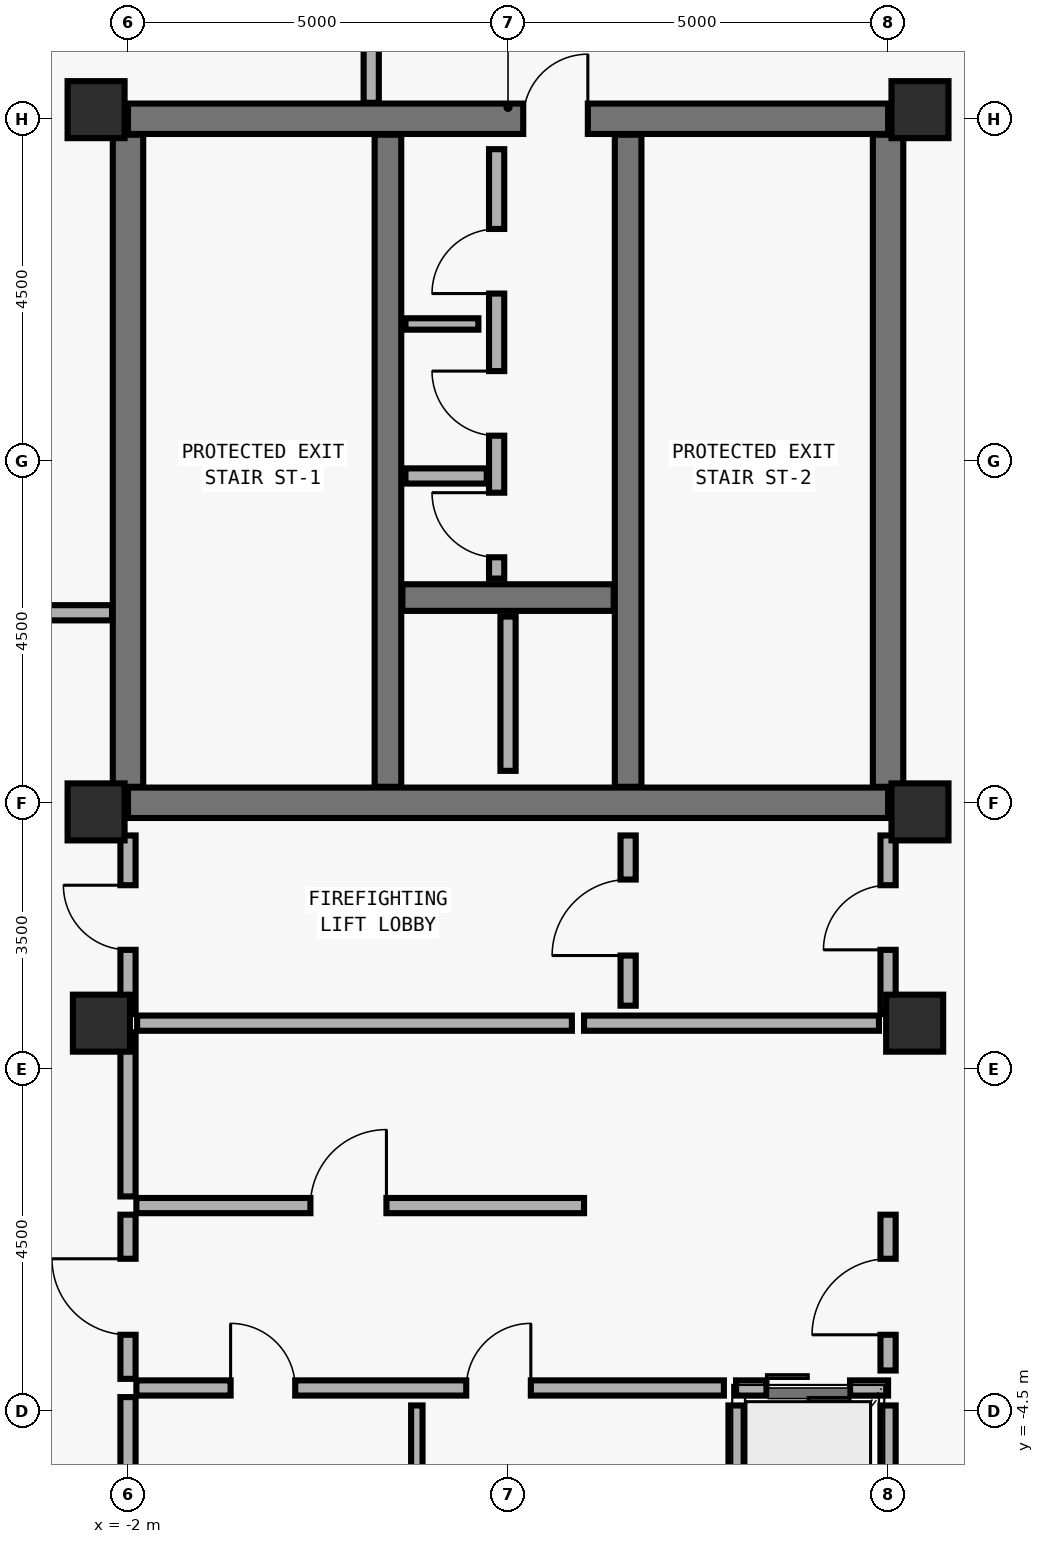
"""IFC4 building model, lengths in metres.
Left out: names, types, materials, properties, quantities, classifications, styles, units other than length and angle.
Written with IfcOpenShell. Run it as: python <this file> out.ifc"""

import sys

from ifc_helpers import new_model, si_unit, direction, frame, frame_2d, origin, origin_2d, place, context, subcontext, project, spatial, rectangle, extrude, element, fill, save


model = new_model("IFC4")
c1 = context("Model", 3, precision=1e-05, world=origin(), true_north=direction((0.0, 1.0)))
c2 = subcontext(c1, "Body", "Model", "MODEL_VIEW")
j1 = project(units=[si_unit("LENGTHUNIT", "METRE"), si_unit("PLANEANGLEUNIT", "RADIAN")], contexts=[c1])
p1 = place(None, origin())
s1 = spatial("IfcSite", under=j1, at=p1, CompositionType="ELEMENT")
p2 = place(p1, origin())
s2 = spatial("IfcBuilding", under=s1, at=p2, CompositionType="ELEMENT")
p3 = place(p2, frame((0.0, 0.0, 298.2)))
s3 = spatial("IfcBuildingStorey", under=s2, at=p3, CompositionType="ELEMENT", Elevation=298.2)
p4 = place(p3, frame((-2.0, 3.5, 0.0), z_axis=(0.0, 0.0, 1.0), x_axis=(1.0, 0.0, 0.0)))
e1 = element("IfcWall", 1, at=p4, inside=s3, PredefinedType="SHEAR", context=c2, shape_type="SweptSolid", body=[
    extrude(rectangle(XDim=10.0, YDim=0.4, at=frame_2d((5.0, 0.0))), origin(), (0.0, 0.0, 1.0), 4.192),
])
p5 = place(p3, frame((-2.0, 12.5, 0.0), z_axis=(0.0, 0.0, 1.0), x_axis=(1.0, 0.0, 0.0)))
e2 = element("IfcWall", 2, at=p5, inside=s3, PredefinedType="SHEAR", context=c2, shape_type="SweptSolid", body=[
    extrude(rectangle(XDim=10.0, YDim=0.4, at=frame_2d((5.0, 0.0))), origin(), (0.0, 0.0, 1.0), 4.192),
])
p6 = place(p5, frame((5.2, 0.0, 0.0)))
e3 = element("IfcOpeningElement", 3, at=p6, cuts=e2, PredefinedType="OPENING", context=c2, shape_type="SweptSolid", body=[
    extrude(rectangle(XDim=0.85, YDim=2.1, at=frame_2d((0.425, 1.05))), frame((0.0, 0.21, 0.0), z_axis=(0.0, -1.0, 0.0), x_axis=(1.0, 0.0, 0.0)), (0.0, 0.0, 1.0), 0.42),
])
for number, where, z_axis, x_axis in (
    (4, (-2.0, 3.71, 0.0), (0.0, 0.0, 1.0), (0.0, 1.0, 0.0)),
    (5, (8.0, 3.71, 0.0), (0.0, 0.0, 1.0), (0.0, 1.0, 0.0)),
):
    element("IfcWall", number, at=place(p3, frame(where, z_axis=z_axis, x_axis=x_axis)), inside=s3, PredefinedType="SHEAR", context=c2, shape_type="SweptSolid", body=[
        extrude(rectangle(XDim=8.58, YDim=0.4, at=frame_2d((4.29, 0.0))), origin(), (0.0, 0.0, 1.0), 4.192),
    ])
for number, where, z_axis, x_axis in (
    (6, (1.42, 3.71, 0.0), (0.0, 0.0, 1.0), (0.0, 1.0, 0.0)),
    (7, (4.58, 3.71, 0.0), (0.0, 0.0, 1.0), (0.0, 1.0, 0.0)),
):
    element("IfcWall", number, at=place(p3, frame(where, z_axis=z_axis, x_axis=x_axis)), inside=s3, PredefinedType="SHEAR", context=c2, shape_type="SweptSolid", body=[
        extrude(rectangle(XDim=8.58, YDim=0.35, at=frame_2d((4.29, 0.0))), origin(), (0.0, 0.0, 1.0), 4.192),
    ])
p7 = place(p3, frame((1.61, 6.2, 0.0), z_axis=(0.0, 0.0, 1.0), x_axis=(1.0, 0.0, 0.0)))
e8 = element("IfcWall", 8, at=p7, inside=s3, PredefinedType="SHEAR", context=c2, shape_type="SweptSolid", body=[
    extrude(rectangle(XDim=2.78, YDim=0.35, at=frame_2d((1.39, 0.0))), origin(), (0.0, 0.0, 1.0), 4.192),
])
for number, where, z_axis, x_axis in (
    (9, (-2.42, 12.62, 0.0), (0.0, 0.0, 1.0), (1.0, 0.0, 0.0)),
    (10, (8.42, 12.62, 0.0), (0.0, 0.0, 1.0), (1.0, 0.0, 0.0)),
    (11, (-2.42, 3.38, 0.0), (0.0, 0.0, 1.0), (1.0, 0.0, 0.0)),
    (12, (8.42, 3.38, 0.0), (0.0, 0.0, 1.0), (1.0, 0.0, 0.0)),
    (13, (-2.35, 0.6, 0.0), (0.0, 0.0, 1.0), (1.0, 0.0, 0.0)),
    (14, (8.35, 0.6, 0.0), (0.0, 0.0, 1.0), (1.0, 0.0, 0.0)),
):
    element("IfcColumn", number, at=place(p3, frame(where, z_axis=z_axis, x_axis=x_axis)), inside=s3, PredefinedType="COLUMN", context=c2, shape_type="SweptSolid", body=[
        extrude(rectangle(XDim=0.75, YDim=0.75, at=origin_2d()), origin(), (0.0, 0.0, 1.0), 4.175),
    ])
p8 = place(p3, frame((3.0, 3.92, 0.0), z_axis=(0.0, 0.0, 1.0), x_axis=(0.0, 1.0, 0.0)))
e15 = element("IfcWall", 15, at=p8, inside=s3, PredefinedType="SOLIDWALL", context=c2, shape_type="SweptSolid", body=[
    extrude(rectangle(XDim=2.03, YDim=0.2, at=frame_2d((1.015, 0.0))), origin(), (0.0, 0.0, 1.0), 3.96),
])
p9 = place(p3, frame((1.65, 7.8, 0.0), z_axis=(0.0, 0.0, 1.0), x_axis=(1.0, 0.0, 0.0)))
e16 = element("IfcWall", 16, at=p9, inside=s3, PredefinedType="SOLIDWALL", context=c2, shape_type="SweptSolid", body=[
    extrude(rectangle(XDim=1.07, YDim=0.2, at=frame_2d((0.535, 0.0))), origin(), (0.0, 0.0, 1.0), 3.96),
])
p10 = place(p3, frame((4.0, 0.6, 0.0), z_axis=(0.0, 0.0, 1.0), x_axis=(1.0, 0.0, 0.0)))
e17 = element("IfcWall", 17, at=p10, inside=s3, PredefinedType="SOLIDWALL", context=c2, shape_type="SweptSolid", body=[
    extrude(rectangle(XDim=3.88, YDim=0.2, at=frame_2d((1.94, 0.0))), origin(), (0.0, 0.0, 1.0), 3.672),
])
p11 = place(p3, frame((6.0, -4.2, 0.0), z_axis=(0.0, 0.0, 1.0), x_axis=(1.0, 0.0, 0.0)))
e18 = element("IfcWall", 18, at=p11, inside=s3, PredefinedType="SOLIDWALL", context=c2, shape_type="SweptSolid", body=[
    extrude(rectangle(XDim=2.0, YDim=0.2, at=frame_2d((1.0, 0.0))), origin(), (0.0, 0.0, 1.0), 3.96),
])
p12 = place(p11, frame((0.4, 0.0, 0.0)))
e19 = element("IfcOpeningElement", 19, at=p12, cuts=e18, PredefinedType="OPENING", context=c2, shape_type="SweptSolid", body=[
    extrude(rectangle(XDim=1.1, YDim=2.2, at=frame_2d((0.55, 1.1))), frame((0.0, 0.11, 0.0), z_axis=(0.0, -1.0, 0.0), x_axis=(1.0, 0.0, 0.0)), (0.0, 0.0, 1.0), 0.22),
])
p13 = place(p3, frame((6.0, -6.37, 0.0), z_axis=(0.0, 0.0, 1.0), x_axis=(0.0, 1.0, 0.0)))
e20 = element("IfcWall", 20, at=p13, inside=s3, PredefinedType="SOLIDWALL", context=c2, shape_type="SweptSolid", body=[
    extrude(rectangle(XDim=1.94, YDim=0.2, at=frame_2d((0.97, 0.0))), origin(), (0.0, 0.0, 1.0), 3.96),
])
p14 = place(p3, frame((8.0, -6.37, 0.0), z_axis=(0.0, 0.0, 1.0), x_axis=(0.0, 1.0, 0.0)))
e21 = element("IfcWall", 21, at=p14, inside=s3, PredefinedType="SOLIDWALL", context=c2, shape_type="SweptSolid", body=[
    extrude(rectangle(XDim=1.94, YDim=0.2, at=frame_2d((0.97, 0.0))), origin(), (0.0, 0.0, 1.0), 3.672),
])
p15 = place(p3, frame((2.85, 6.45, 0.0), z_axis=(0.0, 0.0, 1.0), x_axis=(0.0, 1.0, 0.0)))
e22 = element("IfcWall", 22, at=p15, inside=s3, PredefinedType="MOVABLE", context=c2, shape_type="SweptSolid", body=[
    extrude(rectangle(XDim=5.65, YDim=0.2, at=frame_2d((2.825, 0.0))), origin(), (0.0, 0.0, 1.0), 3.96),
])
p16 = place(p15, frame((1.88, 0.0, 0.0)))
e23 = element("IfcOpeningElement", 23, at=p16, cuts=e22, PredefinedType="OPENING", context=c2, shape_type="SweptSolid", body=[
    extrude(rectangle(XDim=0.85, YDim=2.05, at=frame_2d((0.425, 1.025))), frame((0.0, 0.11, 0.0), z_axis=(0.0, -1.0, 0.0), x_axis=(1.0, 0.0, 0.0)), (0.0, 0.0, 1.0), 0.22),
])
p17 = place(p15, frame((3.75, 0.0, 0.0)))
e24 = element("IfcOpeningElement", 24, at=p17, cuts=e22, PredefinedType="OPENING", context=c2, shape_type="SweptSolid", body=[
    extrude(rectangle(XDim=0.85, YDim=2.1, at=frame_2d((0.425, 1.05))), frame((0.0, 0.11, 0.0), z_axis=(0.0, -1.0, 0.0), x_axis=(1.0, 0.0, 0.0)), (0.0, 0.0, 1.0), 0.22),
])
p18 = place(p15, frame((0.28, 0.0, 0.0)))
e25 = element("IfcOpeningElement", 25, at=p18, cuts=e22, PredefinedType="OPENING", context=c2, shape_type="SweptSolid", body=[
    extrude(rectangle(XDim=0.85, YDim=2.1, at=frame_2d((0.425, 1.05))), frame((0.0, 0.11, 0.0), z_axis=(0.0, -1.0, 0.0), x_axis=(1.0, 0.0, 0.0)), (0.0, 0.0, 1.0), 0.22),
])
p19 = place(p3, frame((4.58, 0.83, 0.0), z_axis=(0.0, 0.0, 1.0), x_axis=(0.0, 1.0, 0.0)))
e26 = element("IfcWall", 26, at=p19, inside=s3, PredefinedType="MOVABLE", context=c2, shape_type="SweptSolid", body=[
    extrude(rectangle(XDim=2.24, YDim=0.2, at=frame_2d((1.12, 0.0))), origin(), (0.0, 0.0, 1.0), 3.96),
])
p20 = place(p19, frame((0.66, 0.0, 0.0)))
e27 = element("IfcOpeningElement", 27, at=p20, cuts=e26, PredefinedType="OPENING", context=c2, shape_type="SweptSolid", body=[
    extrude(rectangle(XDim=1.0, YDim=2.1, at=frame_2d((0.5, 1.05))), frame((0.0, 0.11, 0.0), z_axis=(0.0, -1.0, 0.0), x_axis=(1.0, 0.0, 0.0)), (0.0, 0.0, 1.0), 0.22),
])
p21 = place(p3, frame((-2.0, 0.72, 0.0), z_axis=(0.0, 0.0, 1.0), x_axis=(0.0, 1.0, 0.0)))
e28 = element("IfcWall", 28, at=p21, inside=s3, PredefinedType="MOVABLE", context=c2, shape_type="SweptSolid", body=[
    extrude(rectangle(XDim=2.35, YDim=0.2, at=frame_2d((1.175, 0.0))), origin(), (0.0, 0.0, 1.0), 3.292),
])
p22 = place(p21, frame((0.845, 0.0, 0.0)))
e29 = element("IfcOpeningElement", 29, at=p22, cuts=e28, PredefinedType="OPENING", context=c2, shape_type="SweptSolid", body=[
    extrude(rectangle(XDim=0.85, YDim=2.1, at=frame_2d((0.425, 1.05))), frame((0.0, 0.11, 0.0), z_axis=(0.0, -1.0, 0.0), x_axis=(1.0, 0.0, 0.0)), (0.0, 0.0, 1.0), 0.22),
])
p23 = place(p3, frame((8.0, 0.72, 0.0), z_axis=(0.0, 0.0, 1.0), x_axis=(0.0, 1.0, 0.0)))
e30 = element("IfcWall", 30, at=p23, inside=s3, PredefinedType="MOVABLE", context=c2, shape_type="SweptSolid", body=[
    extrude(rectangle(XDim=2.35, YDim=0.2, at=frame_2d((1.175, 0.0))), origin(), (0.0, 0.0, 1.0), 3.292),
])
p24 = place(p23, frame((0.845, 0.0, 0.0)))
e31 = element("IfcOpeningElement", 31, at=p24, cuts=e30, PredefinedType="OPENING", context=c2, shape_type="SweptSolid", body=[
    extrude(rectangle(XDim=0.85, YDim=2.1, at=frame_2d((0.425, 1.05))), frame((0.0, 0.11, 0.0), z_axis=(0.0, -1.0, 0.0), x_axis=(1.0, 0.0, 0.0)), (0.0, 0.0, 1.0), 0.22),
])
p25 = place(p3, frame((-2.0, -4.08, 0.0), z_axis=(0.0, 0.0, 1.0), x_axis=(0.0, 1.0, 0.0)))
e32 = element("IfcWall", 32, at=p25, inside=s3, PredefinedType="MOVABLE", context=c2, shape_type="SweptSolid", body=[
    extrude(rectangle(XDim=2.16, YDim=0.2, at=frame_2d((1.08, 0.0))), origin(), (0.0, 0.0, 1.0), 3.672),
])
p26 = place(p25, frame((0.58, 0.0, 0.0)))
e33 = element("IfcOpeningElement", 33, at=p26, cuts=e32, PredefinedType="OPENING", context=c2, shape_type="SweptSolid", body=[
    extrude(rectangle(XDim=1.0, YDim=2.1, at=frame_2d((0.5, 1.05))), frame((0.0, 0.11, 0.0), z_axis=(0.0, -1.0, 0.0), x_axis=(1.0, 0.0, 0.0)), (0.0, 0.0, 1.0), 0.22),
])
p27 = place(p3, frame((8.0, -3.97, 0.0), z_axis=(0.0, 0.0, 1.0), x_axis=(0.0, 1.0, 0.0)))
e34 = element("IfcWall", 34, at=p27, inside=s3, PredefinedType="MOVABLE", context=c2, shape_type="SweptSolid", body=[
    extrude(rectangle(XDim=2.05, YDim=0.2, at=frame_2d((1.025, 0.0))), origin(), (0.0, 0.0, 1.0), 3.672),
])
p28 = place(p27, frame((0.47, 0.0, 0.0)))
e35 = element("IfcOpeningElement", 35, at=p28, cuts=e34, PredefinedType="OPENING", context=c2, shape_type="SweptSolid", body=[
    extrude(rectangle(XDim=1.0, YDim=2.1, at=frame_2d((0.5, 1.05))), frame((0.0, 0.11, 0.0), z_axis=(0.0, -1.0, 0.0), x_axis=(1.0, 0.0, 0.0)), (0.0, 0.0, 1.0), 0.22),
])
p29 = place(p3, frame((-1.89, -1.8, 0.0), z_axis=(0.0, 0.0, 1.0), x_axis=(1.0, 0.0, 0.0)))
e36 = element("IfcWall", 36, at=p29, inside=s3, PredefinedType="MOVABLE", context=c2, shape_type="SweptSolid", body=[
    extrude(rectangle(XDim=5.89, YDim=0.2, at=frame_2d((2.945, 0.0))), origin(), (0.0, 0.0, 1.0), 3.96),
])
p30 = place(p29, frame((2.29, 0.0, 0.0)))
e37 = element("IfcOpeningElement", 37, at=p30, cuts=e36, PredefinedType="OPENING", context=c2, shape_type="SweptSolid", body=[
    extrude(rectangle(XDim=1.0, YDim=2.1, at=frame_2d((0.5, 1.05))), frame((0.0, 0.11, 0.0), z_axis=(0.0, -1.0, 0.0), x_axis=(1.0, 0.0, 0.0)), (0.0, 0.0, 1.0), 0.22),
])
p31 = place(p3, frame((-1.89, -4.2, 0.0), z_axis=(0.0, 0.0, 1.0), x_axis=(1.0, 0.0, 0.0)))
e38 = element("IfcWall", 38, at=p31, inside=s3, PredefinedType="MOVABLE", context=c2, shape_type="SweptSolid", body=[
    extrude(rectangle(XDim=7.73, YDim=0.2, at=frame_2d((3.865, 0.0))), origin(), (0.0, 0.0, 1.0), 3.96),
])
p32 = place(p31, frame((1.24, 0.0, 0.0)))
e39 = element("IfcOpeningElement", 39, at=p32, cuts=e38, PredefinedType="OPENING", context=c2, shape_type="SweptSolid", body=[
    extrude(rectangle(XDim=0.85, YDim=2.1, at=frame_2d((0.425, 1.05))), frame((0.0, 0.11, 0.0), z_axis=(0.0, -1.0, 0.0), x_axis=(1.0, 0.0, 0.0)), (0.0, 0.0, 1.0), 0.22),
])
p33 = place(p31, frame((4.34, 0.0, 0.0)))
e40 = element("IfcOpeningElement", 40, at=p33, cuts=e38, PredefinedType="OPENING", context=c2, shape_type="SweptSolid", body=[
    extrude(rectangle(XDim=0.85, YDim=2.1, at=frame_2d((0.425, 1.05))), frame((0.0, 0.11, 0.0), z_axis=(0.0, -1.0, 0.0), x_axis=(1.0, 0.0, 0.0)), (0.0, 0.0, 1.0), 0.22),
])
p34 = place(p3, frame((1.65, 9.8, 0.0), z_axis=(0.0, 0.0, 1.0), x_axis=(1.0, 0.0, 0.0)))
e41 = element("IfcWall", 41, at=p34, inside=s3, PredefinedType="PARTITIONING", context=c2, shape_type="SweptSolid", body=[
    extrude(rectangle(XDim=0.96, YDim=0.15, at=frame_2d((0.48, 0.0))), origin(), (0.0, 0.0, 1.0), 3.96),
])
p35 = place(p3, frame((-1.88, 0.6, 0.0), z_axis=(0.0, 0.0, 1.0), x_axis=(1.0, 0.0, 0.0)))
e42 = element("IfcWall", 42, at=p35, inside=s3, PredefinedType="MOVABLE", context=c2, shape_type="SweptSolid", body=[
    extrude(rectangle(XDim=5.72, YDim=0.2, at=frame_2d((2.86, 0.0))), origin(), (0.0, 0.0, 1.0), 3.672),
])
p36 = place(p3, frame((-2.0, -1.68, 0.0), z_axis=(0.0, 0.0, 1.0), x_axis=(0.0, 1.0, 0.0)))
e43 = element("IfcWall", 43, at=p36, inside=s3, PredefinedType="MOVABLE", context=c2, shape_type="SweptSolid", body=[
    extrude(rectangle(XDim=2.16, YDim=0.2, at=frame_2d((1.08, 0.0))), origin(), (0.0, 0.0, 1.0), 3.672),
])
p37 = place(p3, frame((1.8, -6.48, 0.0), z_axis=(0.0, 0.0, 1.0), x_axis=(0.0, 1.0, 0.0)))
e44 = element("IfcWall", 44, at=p37, inside=s3, PredefinedType="PARTITIONING", context=c2, shape_type="SweptSolid", body=[
    extrude(rectangle(XDim=2.05, YDim=0.15, at=frame_2d((1.025, 0.0))), origin(), (0.0, 0.0, 1.0), 3.96),
])
p38 = place(p3, frame((-2.0, -6.37, 0.0), z_axis=(0.0, 0.0, 1.0), x_axis=(0.0, 1.0, 0.0)))
e45 = element("IfcWall", 45, at=p38, inside=s3, PredefinedType="MOVABLE", context=c2, shape_type="SweptSolid", body=[
    extrude(rectangle(XDim=2.05, YDim=0.2, at=frame_2d((1.025, 0.0))), origin(), (0.0, 0.0, 1.0), 3.672),
])
p39 = place(p3, frame((-2.21, 6.0, 0.0), z_axis=(0.0, 0.0, 1.0), x_axis=(-1.0, 0.0, 0.0)))
e46 = element("IfcWall", 46, at=p39, inside=s3, PredefinedType="MOVABLE", context=c2, shape_type="SweptSolid", body=[
    extrude(rectangle(XDim=2.28, YDim=0.2, at=frame_2d((1.14, 0.0))), origin(), (0.0, 0.0, 1.0), 3.96),
])
p40 = place(p3, frame((1.2, 14.49, 0.0), z_axis=(0.0, 0.0, 1.0), x_axis=(0.0, -1.0, 0.0)))
e47 = element("IfcWall", 47, at=p40, inside=s3, PredefinedType="MOVABLE", context=c2, shape_type="SweptSolid", body=[
    extrude(rectangle(XDim=1.78, YDim=0.2, at=frame_2d((0.89, 0.0))), origin(), (0.0, 0.0, 1.0), 3.96),
])
p41 = place(p6, origin())
e48 = element("IfcDoor", 48, at=p41, inside=s3, OperationType="SINGLE_SWING_RIGHT", PredefinedType="DOOR", context=c2, shape_type="SweptSolid", body=[
    extrude(rectangle(XDim=0.85, YDim=2.1, at=frame_2d((0.425, 1.05))), frame((0.0, 0.025, 0.0), z_axis=(0.0, -1.0, 0.0), x_axis=(1.0, 0.0, 0.0)), (0.0, 0.0, 1.0), 0.05),
])
fill(e3, e48)
p42 = place(p16, origin())
e49 = element("IfcDoor", 49, at=p42, inside=s3, OperationType="SINGLE_SWING_RIGHT", PredefinedType="DOOR", context=c2, shape_type="SweptSolid", body=[
    extrude(rectangle(XDim=0.85, YDim=2.05, at=frame_2d((0.425, 1.025))), frame((0.0, 0.025, 0.0), z_axis=(0.0, -1.0, 0.0), x_axis=(1.0, 0.0, 0.0)), (0.0, 0.0, 1.0), 0.05),
])
fill(e23, e49)
p43 = place(p17, origin())
e50 = element("IfcDoor", 50, at=p43, inside=s3, OperationType="SINGLE_SWING_LEFT", PredefinedType="DOOR", context=c2, shape_type="SweptSolid", body=[
    extrude(rectangle(XDim=0.85, YDim=2.1, at=frame_2d((0.425, 1.05))), frame((0.0, 0.025, 0.0), z_axis=(0.0, -1.0, 0.0), x_axis=(1.0, 0.0, 0.0)), (0.0, 0.0, 1.0), 0.05),
])
fill(e24, e50)
p44 = place(p18, origin())
e51 = element("IfcDoor", 51, at=p44, inside=s3, OperationType="SINGLE_SWING_RIGHT", PredefinedType="DOOR", context=c2, shape_type="SweptSolid", body=[
    extrude(rectangle(XDim=0.85, YDim=2.1, at=frame_2d((0.425, 1.05))), frame((0.0, 0.025, 0.0), z_axis=(0.0, -1.0, 0.0), x_axis=(1.0, 0.0, 0.0)), (0.0, 0.0, 1.0), 0.05),
])
fill(e25, e51)
p45 = place(p20, origin())
e52 = element("IfcDoor", 52, at=p45, inside=s3, OperationType="SINGLE_SWING_LEFT", PredefinedType="DOOR", context=c2, shape_type="SweptSolid", body=[
    extrude(rectangle(XDim=1.0, YDim=2.1, at=frame_2d((0.5, 1.05))), frame((0.0, 0.025, 0.0), z_axis=(0.0, -1.0, 0.0), x_axis=(1.0, 0.0, 0.0)), (0.0, 0.0, 1.0), 0.05),
])
fill(e27, e52)
p46 = place(p22, origin())
e53 = element("IfcDoor", 53, at=p46, inside=s3, OperationType="SINGLE_SWING_RIGHT", PredefinedType="DOOR", context=c2, shape_type="SweptSolid", body=[
    extrude(rectangle(XDim=0.85, YDim=2.1, at=frame_2d((0.425, 1.05))), frame((0.0, 0.025, 0.0), z_axis=(0.0, -1.0, 0.0), x_axis=(1.0, 0.0, 0.0)), (0.0, 0.0, 1.0), 0.05),
])
fill(e29, e53)
p47 = place(p24, origin())
e54 = element("IfcDoor", 54, at=p47, inside=s3, OperationType="SINGLE_SWING_LEFT", PredefinedType="DOOR", context=c2, shape_type="SweptSolid", body=[
    extrude(rectangle(XDim=0.85, YDim=2.1, at=frame_2d((0.425, 1.05))), frame((0.0, 0.025, 0.0), z_axis=(0.0, -1.0, 0.0), x_axis=(1.0, 0.0, 0.0)), (0.0, 0.0, 1.0), 0.05),
])
fill(e31, e54)
p48 = place(p26, origin())
e55 = element("IfcDoor", 55, at=p48, inside=s3, OperationType="SINGLE_SWING_RIGHT", PredefinedType="DOOR", context=c2, shape_type="SweptSolid", body=[
    extrude(rectangle(XDim=1.0, YDim=2.1, at=frame_2d((0.5, 1.05))), frame((0.0, 0.025, 0.0), z_axis=(0.0, -1.0, 0.0), x_axis=(1.0, 0.0, 0.0)), (0.0, 0.0, 1.0), 0.05),
])
fill(e33, e55)
p49 = place(p28, origin())
e56 = element("IfcDoor", 56, at=p49, inside=s3, OperationType="SINGLE_SWING_LEFT", PredefinedType="DOOR", context=c2, shape_type="SweptSolid", body=[
    extrude(rectangle(XDim=1.0, YDim=2.1, at=frame_2d((0.5, 1.05))), frame((0.0, 0.025, 0.0), z_axis=(0.0, -1.0, 0.0), x_axis=(1.0, 0.0, 0.0)), (0.0, 0.0, 1.0), 0.05),
])
fill(e35, e56)
p50 = place(p30, origin())
e57 = element("IfcDoor", 57, at=p50, inside=s3, OperationType="SINGLE_SWING_RIGHT", PredefinedType="DOOR", context=c2, shape_type="SweptSolid", body=[
    extrude(rectangle(XDim=1.0, YDim=2.1, at=frame_2d((0.5, 1.05))), frame((0.0, 0.025, 0.0), z_axis=(0.0, -1.0, 0.0), x_axis=(1.0, 0.0, 0.0)), (0.0, 0.0, 1.0), 0.05),
])
fill(e37, e57)
p51 = place(p32, origin())
e58 = element("IfcDoor", 58, at=p51, inside=s3, OperationType="SINGLE_SWING_LEFT", PredefinedType="DOOR", context=c2, shape_type="SweptSolid", body=[
    extrude(rectangle(XDim=0.85, YDim=2.1, at=frame_2d((0.425, 1.05))), frame((0.0, 0.025, 0.0), z_axis=(0.0, -1.0, 0.0), x_axis=(1.0, 0.0, 0.0)), (0.0, 0.0, 1.0), 0.05),
])
fill(e39, e58)
p52 = place(p33, origin())
e59 = element("IfcDoor", 59, at=p52, inside=s3, OperationType="SINGLE_SWING_RIGHT", PredefinedType="DOOR", context=c2, shape_type="SweptSolid", body=[
    extrude(rectangle(XDim=0.85, YDim=2.1, at=frame_2d((0.425, 1.05))), frame((0.0, 0.025, 0.0), z_axis=(0.0, -1.0, 0.0), x_axis=(1.0, 0.0, 0.0)), (0.0, 0.0, 1.0), 0.05),
])
fill(e40, e59)
p53 = place(p12, origin())
e60 = element("IfcDoor", 60, at=p53, inside=s3, OperationType="DOUBLE_DOOR_SLIDING", PredefinedType="DOOR", context=c2, shape_type="SweptSolid", body=[
    extrude(rectangle(XDim=1.1, YDim=2.2, at=frame_2d((0.55, 1.1))), frame((0.0, 0.025, 0.0), z_axis=(0.0, -1.0, 0.0), x_axis=(1.0, 0.0, 0.0)), (0.0, 0.0, 1.0), 0.05),
])
fill(e19, e60)
save(model, sys.argv[1])
